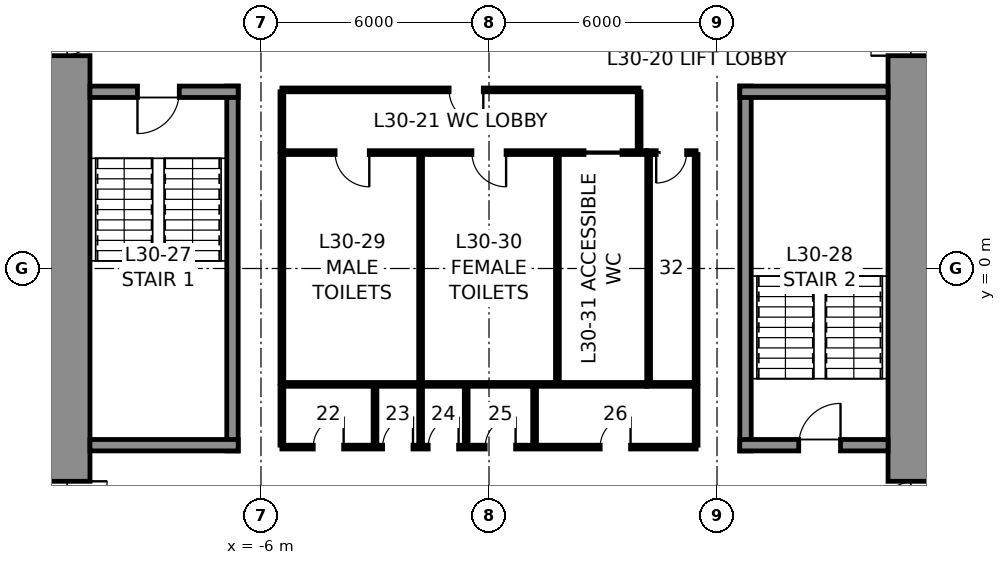
"""IFC4 building model, lengths in metres.
Left out: names, types, materials, properties, quantities, classifications, styles, units other than length and angle.
Written with IfcOpenShell. Run it as: python <this file> out.ifc"""

import sys

from ifc_helpers import new_model, si_unit, direction, frame, frame_2d, origin, place, context, subcontext, project, spatial, rectangle, extrude, element, fill, save


model = new_model("IFC4")
c1 = context("Model", 3, precision=1e-05, world=origin(), true_north=direction((0.0, 1.0)))
c2 = subcontext(c1, "Body", "Model", "MODEL_VIEW")
j1 = project(units=[si_unit("LENGTHUNIT", "METRE"), si_unit("PLANEANGLEUNIT", "RADIAN")], contexts=[c1])
p1 = place(None, origin())
s1 = spatial("IfcSite", under=j1, at=p1, CompositionType="ELEMENT")
p2 = place(p1, origin())
s2 = spatial("IfcBuilding", under=s1, at=p2, CompositionType="ELEMENT")
p3 = place(p2, frame((0.0, 0.0, 147.8)))
s3 = spatial("IfcBuildingStorey", under=s2, at=p3, CompositionType="ELEMENT", Elevation=147.8)
p4 = place(p3, frame((11.25, 10.5, 0.0), z_axis=(0.0, 0.0, 1.0), x_axis=(0.0, -1.0, 0.0)))
e1 = element("IfcWall", 1, at=p4, inside=s3, PredefinedType="SHEAR", context=c2, shape_type="SweptSolid", body=[
    extrude(rectangle(XDim=21.0, YDim=1.5, at=frame_2d((10.5, 0.0))), origin(), (0.0, 0.0, 1.0), 4.0),
])
p5 = place(p4, frame((3.7, 0.0, 0.0)))
e2 = element("IfcOpeningElement", 2, at=p5, cuts=e1, PredefinedType="OPENING", context=c2, shape_type="SweptSolid", body=[
    extrude(rectangle(XDim=1.2, YDim=2.3, at=frame_2d((0.6, 1.15))), frame((0.0, 0.76, 0.0), z_axis=(0.0, -1.0, 0.0), x_axis=(1.0, 0.0, 0.0)), (0.0, 0.0, 1.0), 1.52),
])
p6 = place(p4, frame((16.1, 0.0, 0.0)))
e3 = element("IfcOpeningElement", 3, at=p6, cuts=e1, PredefinedType="OPENING", context=c2, shape_type="SweptSolid", body=[
    extrude(rectangle(XDim=1.2, YDim=2.3, at=frame_2d((0.6, 1.15))), frame((0.0, 0.76, 0.0), z_axis=(0.0, -1.0, 0.0), x_axis=(1.0, 0.0, 0.0)), (0.0, 0.0, 1.0), 1.52),
])
p7 = place(p3, frame((-11.25, -10.5, 0.0), z_axis=(0.0, 0.0, 1.0), x_axis=(0.0, 1.0, 0.0)))
e4 = element("IfcWall", 4, at=p7, inside=s3, PredefinedType="SHEAR", context=c2, shape_type="SweptSolid", body=[
    extrude(rectangle(XDim=21.0, YDim=1.5, at=frame_2d((10.5, 0.0))), origin(), (0.0, 0.0, 1.0), 4.0),
])
p8 = place(p7, frame((16.1, 0.0, 0.0)))
e5 = element("IfcOpeningElement", 5, at=p8, cuts=e4, PredefinedType="OPENING", context=c2, shape_type="SweptSolid", body=[
    extrude(rectangle(XDim=1.2, YDim=2.3, at=frame_2d((0.6, 1.15))), frame((0.0, 0.76, 0.0), z_axis=(0.0, -1.0, 0.0), x_axis=(1.0, 0.0, 0.0)), (0.0, 0.0, 1.0), 1.52),
])
p9 = place(p7, frame((3.7, 0.0, 0.0)))
e6 = element("IfcOpeningElement", 6, at=p9, cuts=e4, PredefinedType="OPENING", context=c2, shape_type="SweptSolid", body=[
    extrude(rectangle(XDim=1.2, YDim=2.3, at=frame_2d((0.6, 1.15))), frame((0.0, 0.76, 0.0), z_axis=(0.0, -1.0, 0.0), x_axis=(1.0, 0.0, 0.0)), (0.0, 0.0, 1.0), 1.52),
])
p10 = place(p3, frame((-6.75, -4.8, 0.0), z_axis=(0.0, 0.0, 1.0), x_axis=(0.0, 1.0, 0.0)))
e7 = element("IfcWall", 7, at=p10, inside=s3, PredefinedType="SOLIDWALL", context=c2, shape_type="SweptSolid", body=[
    extrude(rectangle(XDim=9.6, YDim=0.3, at=frame_2d((4.8, 0.0))), origin(), (0.0, 0.0, 1.0), 3.75),
])
p11 = place(p3, frame((-10.5, 4.65, 0.0), z_axis=(0.0, 0.0, 1.0), x_axis=(1.0, 0.0, 0.0)))
e8 = element("IfcWall", 8, at=p11, inside=s3, PredefinedType="SOLIDWALL", context=c2, shape_type="SweptSolid", body=[
    extrude(rectangle(XDim=3.9, YDim=0.3, at=frame_2d((1.95, 0.0))), origin(), (0.0, 0.0, 1.0), 3.75),
])
p12 = place(p11, frame((1.25, 0.0, 0.0)))
e9 = element("IfcOpeningElement", 9, at=p12, cuts=e8, PredefinedType="OPENING", context=c2, shape_type="SweptSolid", body=[
    extrude(rectangle(XDim=1.1, YDim=2.3, at=frame_2d((0.55, 1.15))), frame((0.0, 0.16, 0.0), z_axis=(0.0, -1.0, 0.0), x_axis=(1.0, 0.0, 0.0)), (0.0, 0.0, 1.0), 0.32),
])
p13 = place(p3, frame((-6.6, -4.65, 0.0), z_axis=(0.0, 0.0, 1.0), x_axis=(-1.0, 0.0, 0.0)))
e10 = element("IfcWall", 10, at=p13, inside=s3, PredefinedType="SOLIDWALL", context=c2, shape_type="SweptSolid", body=[
    extrude(rectangle(XDim=3.9, YDim=0.3, at=frame_2d((1.95, 0.0))), origin(), (0.0, 0.0, 1.0), 3.75),
])
p14 = place(p3, frame((6.75, -4.8, 0.0), z_axis=(0.0, 0.0, 1.0), x_axis=(0.0, 1.0, 0.0)))
e11 = element("IfcWall", 11, at=p14, inside=s3, PredefinedType="SOLIDWALL", context=c2, shape_type="SweptSolid", body=[
    extrude(rectangle(XDim=9.6, YDim=0.3, at=frame_2d((4.8, 0.0))), origin(), (0.0, 0.0, 1.0), 3.75),
])
p15 = place(p3, frame((6.6, 4.65, 0.0), z_axis=(0.0, 0.0, 1.0), x_axis=(1.0, 0.0, 0.0)))
e12 = element("IfcWall", 12, at=p15, inside=s3, PredefinedType="SOLIDWALL", context=c2, shape_type="SweptSolid", body=[
    extrude(rectangle(XDim=3.9, YDim=0.3, at=frame_2d((1.95, 0.0))), origin(), (0.0, 0.0, 1.0), 3.75),
])
p16 = place(p3, frame((10.5, -4.65, 0.0), z_axis=(0.0, 0.0, 1.0), x_axis=(-1.0, 0.0, 0.0)))
e13 = element("IfcWall", 13, at=p16, inside=s3, PredefinedType="SOLIDWALL", context=c2, shape_type="SweptSolid", body=[
    extrude(rectangle(XDim=3.9, YDim=0.3, at=frame_2d((1.95, 0.0))), origin(), (0.0, 0.0, 1.0), 3.75),
])
p17 = place(p16, frame((1.25, 0.0, 0.0)))
e14 = element("IfcOpeningElement", 14, at=p17, cuts=e13, PredefinedType="OPENING", context=c2, shape_type="SweptSolid", body=[
    extrude(rectangle(XDim=1.1, YDim=2.3, at=frame_2d((0.55, 1.15))), frame((0.0, 0.16, 0.0), z_axis=(0.0, -1.0, 0.0), x_axis=(1.0, 0.0, 0.0)), (0.0, 0.0, 1.0), 0.32),
])
p18 = place(p3, frame((-5.45, 3.05, 0.0), z_axis=(0.0, 0.0, 1.0), x_axis=(1.0, 0.0, 0.0)))
e15 = element("IfcWall", 15, at=p18, inside=s3, PredefinedType="PARTITIONING", context=c2, shape_type="SweptSolid", body=[
    extrude(rectangle(XDim=9.6, YDim=0.1, at=frame_2d((4.8, 0.0))), origin(), (0.0, 0.0, 1.0), 3.75),
])
p19 = place(p18, frame((1.4, 0.0, 0.0)))
e16 = element("IfcOpeningElement", 16, at=p19, cuts=e15, PredefinedType="OPENING", context=c2, shape_type="SweptSolid", body=[
    extrude(rectangle(XDim=0.9, YDim=2.3, at=frame_2d((0.45, 1.15))), frame((0.0, 0.06, 0.0), z_axis=(0.0, -1.0, 0.0), x_axis=(1.0, 0.0, 0.0)), (0.0, 0.0, 1.0), 0.12),
])
p20 = place(p18, frame((5.0, 0.0, 0.0)))
e17 = element("IfcOpeningElement", 17, at=p20, cuts=e15, PredefinedType="OPENING", context=c2, shape_type="SweptSolid", body=[
    extrude(rectangle(XDim=0.9, YDim=2.3, at=frame_2d((0.45, 1.15))), frame((0.0, 0.06, 0.0), z_axis=(0.0, -1.0, 0.0), x_axis=(1.0, 0.0, 0.0)), (0.0, 0.0, 1.0), 0.12),
])
p21 = place(p18, frame((7.95, 0.0, 0.0)))
e18 = element("IfcOpeningElement", 18, at=p21, cuts=e15, PredefinedType="OPENING", context=c2, shape_type="SweptSolid", body=[
    extrude(rectangle(XDim=1.0, YDim=2.3, at=frame_2d((0.5, 1.15))), frame((0.0, 0.06, 0.0), z_axis=(0.0, -1.0, 0.0), x_axis=(1.0, 0.0, 0.0)), (0.0, 0.0, 1.0), 0.12),
])
p22 = place(p3, frame((4.15, 3.05, 0.0), z_axis=(0.0, 0.0, 1.0), x_axis=(1.0, 0.0, 0.0)))
e19 = element("IfcWall", 19, at=p22, inside=s3, PredefinedType="PARTITIONING", context=c2, shape_type="SweptSolid", body=[
    extrude(rectangle(XDim=1.3, YDim=0.1, at=frame_2d((0.65, 0.0))), origin(), (0.0, 0.0, 1.0), 3.75),
])
p23 = place(p22, frame((0.25, 0.0, 0.0)))
e20 = element("IfcOpeningElement", 20, at=p23, cuts=e19, PredefinedType="OPENING", context=c2, shape_type="SweptSolid", body=[
    extrude(rectangle(XDim=0.8, YDim=2.3, at=frame_2d((0.4, 1.15))), frame((0.0, 0.06, 0.0), z_axis=(0.0, -1.0, 0.0), x_axis=(1.0, 0.0, 0.0)), (0.0, 0.0, 1.0), 0.12),
])
p24 = place(p3, frame((4.15, -3.05, 0.0), z_axis=(0.0, 0.0, 1.0), x_axis=(-1.0, 0.0, 0.0)))
e21 = element("IfcWall", 21, at=p24, inside=s3, PredefinedType="PARTITIONING", context=c2, shape_type="SweptSolid", body=[
    extrude(rectangle(XDim=9.6, YDim=0.1, at=frame_2d((4.8, 0.0))), origin(), (0.0, 0.0, 1.0), 3.75),
])
p25 = place(p3, frame((5.45, -3.05, 0.0), z_axis=(0.0, 0.0, 1.0), x_axis=(-1.0, 0.0, 0.0)))
e22 = element("IfcWall", 22, at=p25, inside=s3, PredefinedType="PARTITIONING", context=c2, shape_type="SweptSolid", body=[
    extrude(rectangle(XDim=1.3, YDim=0.1, at=frame_2d((0.65, 0.0))), origin(), (0.0, 0.0, 1.0), 3.75),
])
for number, where, z_axis, x_axis in (
    (23, (5.45, 3.0, 0.0), (0.0, 0.0, 1.0), (0.0, -1.0, 0.0)),
    (24, (-5.45, -3.0, 0.0), (0.0, 0.0, 1.0), (0.0, 1.0, 0.0)),
    (25, (-1.8, -3.0, 0.0), (0.0, 0.0, 1.0), (0.0, 1.0, 0.0)),
    (26, (1.8, -3.0, 0.0), (0.0, 0.0, 1.0), (0.0, 1.0, 0.0)),
    (27, (4.2, -3.0, 0.0), (0.0, 0.0, 1.0), (0.0, 1.0, 0.0)),
):
    element("IfcWall", number, at=place(p3, frame(where, z_axis=z_axis, x_axis=x_axis)), inside=s3, PredefinedType="PARTITIONING", context=c2, shape_type="SweptSolid", body=[
        extrude(rectangle(XDim=6.0, YDim=0.1, at=frame_2d((3.0, 0.0))), origin(), (0.0, 0.0, 1.0), 3.75),
    ])
p26 = place(p3, frame((-5.45, 4.7, 0.0), z_axis=(0.0, 0.0, 1.0), x_axis=(1.0, 0.0, 0.0)))
e28 = element("IfcWall", 28, at=p26, inside=s3, PredefinedType="PARTITIONING", context=c2, shape_type="SweptSolid", body=[
    extrude(rectangle(XDim=9.4, YDim=0.1, at=frame_2d((4.7, 0.0))), origin(), (0.0, 0.0, 1.0), 3.75),
])
p27 = place(p26, frame((4.4, 0.0, 0.0)))
e29 = element("IfcOpeningElement", 29, at=p27, cuts=e28, PredefinedType="OPENING", context=c2, shape_type="SweptSolid", body=[
    extrude(rectangle(XDim=0.9, YDim=2.3, at=frame_2d((0.45, 1.15))), frame((0.0, 0.06, 0.0), z_axis=(0.0, -1.0, 0.0), x_axis=(1.0, 0.0, 0.0)), (0.0, 0.0, 1.0), 0.12),
])
for number, where, z_axis, x_axis in (
    (30, (-5.45, 3.1, 0.0), (0.0, 0.0, 1.0), (0.0, 1.0, 0.0)),
    (31, (3.95, 3.1, 0.0), (0.0, 0.0, 1.0), (0.0, 1.0, 0.0)),
):
    element("IfcWall", number, at=place(p3, frame(where, z_axis=z_axis, x_axis=x_axis)), inside=s3, PredefinedType="PARTITIONING", context=c2, shape_type="SweptSolid", body=[
        extrude(rectangle(XDim=1.55, YDim=0.1, at=frame_2d((0.775, 0.0))), origin(), (0.0, 0.0, 1.0), 3.75),
    ])
p28 = place(p3, frame((5.45, -4.7, 0.0), z_axis=(0.0, 0.0, 1.0), x_axis=(-1.0, 0.0, 0.0)))
e32 = element("IfcWall", 32, at=p28, inside=s3, PredefinedType="PARTITIONING", context=c2, shape_type="SweptSolid", body=[
    extrude(rectangle(XDim=10.9, YDim=0.1, at=frame_2d((5.45, 0.0))), origin(), (0.0, 0.0, 1.0), 3.75),
])
p29 = place(p28, frame((9.275, 0.0, 0.0)))
e33 = element("IfcOpeningElement", 33, at=p29, cuts=e32, PredefinedType="OPENING", context=c2, shape_type="SweptSolid", body=[
    extrude(rectangle(XDim=0.8, YDim=2.3, at=frame_2d((0.4, 1.15))), frame((0.0, 0.06, 0.0), z_axis=(0.0, -1.0, 0.0), x_axis=(1.0, 0.0, 0.0)), (0.0, 0.0, 1.0), 0.12),
])
p30 = place(p28, frame((7.45, 0.0, 0.0)))
e34 = element("IfcOpeningElement", 34, at=p30, cuts=e32, PredefinedType="OPENING", context=c2, shape_type="SweptSolid", body=[
    extrude(rectangle(XDim=0.8, YDim=2.3, at=frame_2d((0.4, 1.15))), frame((0.0, 0.06, 0.0), z_axis=(0.0, -1.0, 0.0), x_axis=(1.0, 0.0, 0.0)), (0.0, 0.0, 1.0), 0.12),
])
p31 = place(p28, frame((6.25, 0.0, 0.0)))
e35 = element("IfcOpeningElement", 35, at=p31, cuts=e32, PredefinedType="OPENING", context=c2, shape_type="SweptSolid", body=[
    extrude(rectangle(XDim=0.8, YDim=2.3, at=frame_2d((0.4, 1.15))), frame((0.0, 0.06, 0.0), z_axis=(0.0, -1.0, 0.0), x_axis=(1.0, 0.0, 0.0)), (0.0, 0.0, 1.0), 0.12),
])
p32 = place(p28, frame((4.75, 0.0, 0.0)))
e36 = element("IfcOpeningElement", 36, at=p32, cuts=e32, PredefinedType="OPENING", context=c2, shape_type="SweptSolid", body=[
    extrude(rectangle(XDim=0.8, YDim=2.3, at=frame_2d((0.4, 1.15))), frame((0.0, 0.06, 0.0), z_axis=(0.0, -1.0, 0.0), x_axis=(1.0, 0.0, 0.0)), (0.0, 0.0, 1.0), 0.12),
])
p33 = place(p28, frame((1.725, 0.0, 0.0)))
e37 = element("IfcOpeningElement", 37, at=p33, cuts=e32, PredefinedType="OPENING", context=c2, shape_type="SweptSolid", body=[
    extrude(rectangle(XDim=0.8, YDim=2.3, at=frame_2d((0.4, 1.15))), frame((0.0, 0.06, 0.0), z_axis=(0.0, -1.0, 0.0), x_axis=(1.0, 0.0, 0.0)), (0.0, 0.0, 1.0), 0.12),
])
for number, where, z_axis, x_axis in (
    (38, (-5.45, -3.1, 0.0), (0.0, 0.0, 1.0), (0.0, -1.0, 0.0)),
    (39, (5.45, -3.1, 0.0), (0.0, 0.0, 1.0), (0.0, -1.0, 0.0)),
    (40, (-3.0, -3.1, 0.0), (0.0, 0.0, 1.0), (0.0, -1.0, 0.0)),
    (41, (-1.8, -3.1, 0.0), (0.0, 0.0, 1.0), (0.0, -1.0, 0.0)),
    (42, (-0.6, -3.1, 0.0), (0.0, 0.0, 1.0), (0.0, -1.0, 0.0)),
    (43, (1.2, -3.1, 0.0), (0.0, 0.0, 1.0), (0.0, -1.0, 0.0)),
):
    element("IfcWall", number, at=place(p3, frame(where, z_axis=z_axis, x_axis=x_axis)), inside=s3, PredefinedType="PARTITIONING", context=c2, shape_type="SweptSolid", body=[
        extrude(rectangle(XDim=1.55, YDim=0.1, at=frame_2d((0.775, 0.0))), origin(), (0.0, 0.0, 1.0), 3.75),
    ])
p34 = place(p12, frame((1.1, 0.0, 0.0), z_axis=(0.0, 0.0, 1.0), x_axis=(-1.0, 0.0, 0.0)))
e44 = element("IfcDoor", 44, at=p34, inside=s3, OperationType="SINGLE_SWING_RIGHT", PredefinedType="DOOR", context=c2, shape_type="SweptSolid", body=[
    extrude(rectangle(XDim=1.1, YDim=2.3, at=frame_2d((0.55, 1.15))), frame((0.0, 0.025, 0.0), z_axis=(0.0, -1.0, 0.0), x_axis=(1.0, 0.0, 0.0)), (0.0, 0.0, 1.0), 0.05),
])
fill(e9, e44)
p35 = place(p17, frame((1.1, 0.0, 0.0), z_axis=(0.0, 0.0, 1.0), x_axis=(-1.0, 0.0, 0.0)))
e45 = element("IfcDoor", 45, at=p35, inside=s3, OperationType="SINGLE_SWING_RIGHT", PredefinedType="DOOR", context=c2, shape_type="SweptSolid", body=[
    extrude(rectangle(XDim=1.1, YDim=2.3, at=frame_2d((0.55, 1.15))), frame((0.0, 0.025, 0.0), z_axis=(0.0, -1.0, 0.0), x_axis=(1.0, 0.0, 0.0)), (0.0, 0.0, 1.0), 0.05),
])
fill(e14, e45)
p36 = place(p19, frame((0.9, 0.0, 0.0), z_axis=(0.0, 0.0, 1.0), x_axis=(-1.0, 0.0, 0.0)))
e46 = element("IfcDoor", 46, at=p36, inside=s3, OperationType="SINGLE_SWING_LEFT", PredefinedType="DOOR", context=c2, shape_type="SweptSolid", body=[
    extrude(rectangle(XDim=0.9, YDim=2.3, at=frame_2d((0.45, 1.15))), frame((0.0, 0.025, 0.0), z_axis=(0.0, -1.0, 0.0), x_axis=(1.0, 0.0, 0.0)), (0.0, 0.0, 1.0), 0.05),
])
fill(e16, e46)
p37 = place(p20, frame((0.9, 0.0, 0.0), z_axis=(0.0, 0.0, 1.0), x_axis=(-1.0, 0.0, 0.0)))
e47 = element("IfcDoor", 47, at=p37, inside=s3, OperationType="SINGLE_SWING_LEFT", PredefinedType="DOOR", context=c2, shape_type="SweptSolid", body=[
    extrude(rectangle(XDim=0.9, YDim=2.3, at=frame_2d((0.45, 1.15))), frame((0.0, 0.025, 0.0), z_axis=(0.0, -1.0, 0.0), x_axis=(1.0, 0.0, 0.0)), (0.0, 0.0, 1.0), 0.05),
])
fill(e17, e47)
p38 = place(p21, frame((1.0, 0.0, 0.0), z_axis=(0.0, 0.0, 1.0), x_axis=(-1.0, 0.0, 0.0)))
e48 = element("IfcDoor", 48, at=p38, inside=s3, OperationType="SLIDING_TO_LEFT", PredefinedType="DOOR", context=c2, shape_type="SweptSolid", body=[
    extrude(rectangle(XDim=1.0, YDim=2.3, at=frame_2d((0.5, 1.15))), frame((0.0, 0.025, 0.0), z_axis=(0.0, -1.0, 0.0), x_axis=(1.0, 0.0, 0.0)), (0.0, 0.0, 1.0), 0.05),
])
fill(e18, e48)
p39 = place(p23, frame((0.8, 0.0, 0.0), z_axis=(0.0, 0.0, 1.0), x_axis=(-1.0, 0.0, 0.0)))
e49 = element("IfcDoor", 49, at=p39, inside=s3, OperationType="SINGLE_SWING_RIGHT", PredefinedType="DOOR", context=c2, shape_type="SweptSolid", body=[
    extrude(rectangle(XDim=0.8, YDim=2.3, at=frame_2d((0.4, 1.15))), frame((0.0, 0.025, 0.0), z_axis=(0.0, -1.0, 0.0), x_axis=(1.0, 0.0, 0.0)), (0.0, 0.0, 1.0), 0.05),
])
fill(e20, e49)
p40 = place(p27, frame((0.9, 0.0, 0.0), z_axis=(0.0, 0.0, 1.0), x_axis=(-1.0, 0.0, 0.0)))
e50 = element("IfcDoor", 50, at=p40, inside=s3, OperationType="SINGLE_SWING_LEFT", PredefinedType="DOOR", context=c2, shape_type="SweptSolid", body=[
    extrude(rectangle(XDim=0.9, YDim=2.3, at=frame_2d((0.45, 1.15))), frame((0.0, 0.025, 0.0), z_axis=(0.0, -1.0, 0.0), x_axis=(1.0, 0.0, 0.0)), (0.0, 0.0, 1.0), 0.05),
])
fill(e29, e50)
p41 = place(p29, frame((0.8, 0.0, 0.0), z_axis=(0.0, 0.0, 1.0), x_axis=(-1.0, 0.0, 0.0)))
e51 = element("IfcDoor", 51, at=p41, inside=s3, OperationType="SINGLE_SWING_RIGHT", PredefinedType="DOOR", context=c2, shape_type="SweptSolid", body=[
    extrude(rectangle(XDim=0.8, YDim=2.3, at=frame_2d((0.4, 1.15))), frame((0.0, 0.025, 0.0), z_axis=(0.0, -1.0, 0.0), x_axis=(1.0, 0.0, 0.0)), (0.0, 0.0, 1.0), 0.05),
])
fill(e33, e51)
p42 = place(p30, frame((0.8, 0.0, 0.0), z_axis=(0.0, 0.0, 1.0), x_axis=(-1.0, 0.0, 0.0)))
e52 = element("IfcDoor", 52, at=p42, inside=s3, OperationType="SINGLE_SWING_RIGHT", PredefinedType="DOOR", context=c2, shape_type="SweptSolid", body=[
    extrude(rectangle(XDim=0.8, YDim=2.3, at=frame_2d((0.4, 1.15))), frame((0.0, 0.025, 0.0), z_axis=(0.0, -1.0, 0.0), x_axis=(1.0, 0.0, 0.0)), (0.0, 0.0, 1.0), 0.05),
])
fill(e34, e52)
p43 = place(p31, frame((0.8, 0.0, 0.0), z_axis=(0.0, 0.0, 1.0), x_axis=(-1.0, 0.0, 0.0)))
e53 = element("IfcDoor", 53, at=p43, inside=s3, OperationType="SINGLE_SWING_RIGHT", PredefinedType="DOOR", context=c2, shape_type="SweptSolid", body=[
    extrude(rectangle(XDim=0.8, YDim=2.3, at=frame_2d((0.4, 1.15))), frame((0.0, 0.025, 0.0), z_axis=(0.0, -1.0, 0.0), x_axis=(1.0, 0.0, 0.0)), (0.0, 0.0, 1.0), 0.05),
])
fill(e35, e53)
p44 = place(p32, frame((0.8, 0.0, 0.0), z_axis=(0.0, 0.0, 1.0), x_axis=(-1.0, 0.0, 0.0)))
e54 = element("IfcDoor", 54, at=p44, inside=s3, OperationType="SINGLE_SWING_RIGHT", PredefinedType="DOOR", context=c2, shape_type="SweptSolid", body=[
    extrude(rectangle(XDim=0.8, YDim=2.3, at=frame_2d((0.4, 1.15))), frame((0.0, 0.025, 0.0), z_axis=(0.0, -1.0, 0.0), x_axis=(1.0, 0.0, 0.0)), (0.0, 0.0, 1.0), 0.05),
])
fill(e36, e54)
p45 = place(p33, frame((0.8, 0.0, 0.0), z_axis=(0.0, 0.0, 1.0), x_axis=(-1.0, 0.0, 0.0)))
e55 = element("IfcDoor", 55, at=p45, inside=s3, OperationType="SINGLE_SWING_RIGHT", PredefinedType="DOOR", context=c2, shape_type="SweptSolid", body=[
    extrude(rectangle(XDim=0.8, YDim=2.3, at=frame_2d((0.4, 1.15))), frame((0.0, 0.025, 0.0), z_axis=(0.0, -1.0, 0.0), x_axis=(1.0, 0.0, 0.0)), (0.0, 0.0, 1.0), 0.05),
])
fill(e37, e55)
p46 = place(p8, frame((1.2, 0.0, 0.0), z_axis=(0.0, 0.0, 1.0), x_axis=(-1.0, 0.0, 0.0)))
e56 = element("IfcDoor", 56, at=p46, inside=s3, OperationType="SINGLE_SWING_LEFT", PredefinedType="DOOR", context=c2, shape_type="SweptSolid", body=[
    extrude(rectangle(XDim=1.2, YDim=2.3, at=frame_2d((0.6, 1.15))), frame((0.0, 0.025, 0.0), z_axis=(0.0, -1.0, 0.0), x_axis=(1.0, 0.0, 0.0)), (0.0, 0.0, 1.0), 0.05),
])
fill(e5, e56)
p47 = place(p9, frame((1.2, 0.0, 0.0), z_axis=(0.0, 0.0, 1.0), x_axis=(-1.0, 0.0, 0.0)))
e57 = element("IfcDoor", 57, at=p47, inside=s3, OperationType="SINGLE_SWING_LEFT", PredefinedType="DOOR", context=c2, shape_type="SweptSolid", body=[
    extrude(rectangle(XDim=1.2, YDim=2.3, at=frame_2d((0.6, 1.15))), frame((0.0, 0.025, 0.0), z_axis=(0.0, -1.0, 0.0), x_axis=(1.0, 0.0, 0.0)), (0.0, 0.0, 1.0), 0.05),
])
fill(e6, e57)
p48 = place(p5, frame((1.2, 0.0, 0.0), z_axis=(0.0, 0.0, 1.0), x_axis=(-1.0, 0.0, 0.0)))
e58 = element("IfcDoor", 58, at=p48, inside=s3, OperationType="SINGLE_SWING_LEFT", PredefinedType="DOOR", context=c2, shape_type="SweptSolid", body=[
    extrude(rectangle(XDim=1.2, YDim=2.3, at=frame_2d((0.6, 1.15))), frame((0.0, 0.025, 0.0), z_axis=(0.0, -1.0, 0.0), x_axis=(1.0, 0.0, 0.0)), (0.0, 0.0, 1.0), 0.05),
])
fill(e2, e58)
p49 = place(p6, frame((1.2, 0.0, 0.0), z_axis=(0.0, 0.0, 1.0), x_axis=(-1.0, 0.0, 0.0)))
e59 = element("IfcDoor", 59, at=p49, inside=s3, OperationType="SINGLE_SWING_LEFT", PredefinedType="DOOR", context=c2, shape_type="SweptSolid", body=[
    extrude(rectangle(XDim=1.2, YDim=2.3, at=frame_2d((0.6, 1.15))), frame((0.0, 0.025, 0.0), z_axis=(0.0, -1.0, 0.0), x_axis=(1.0, 0.0, 0.0)), (0.0, 0.0, 1.0), 0.05),
])
fill(e3, e59)
save(model, sys.argv[1])
